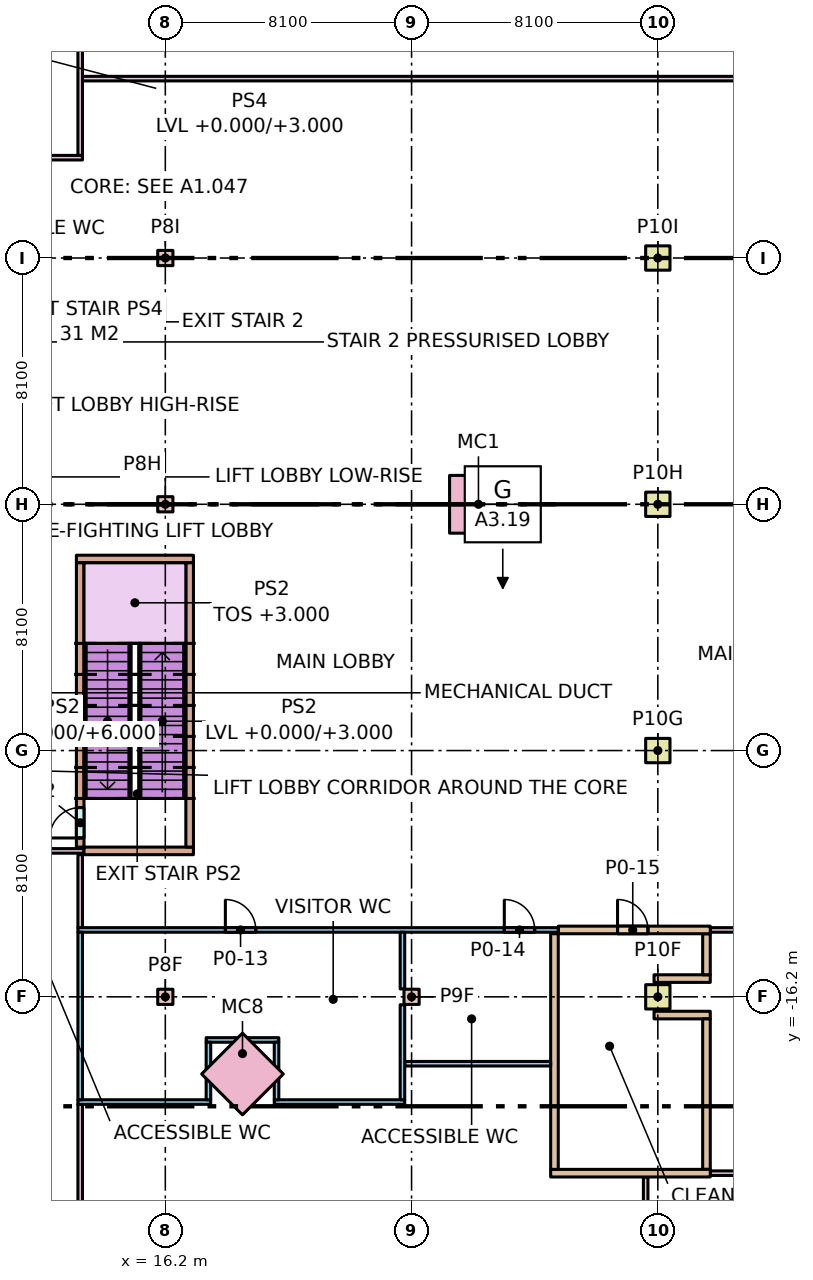
"""IFC4 building model, lengths in metres.
Left out: names, types, materials, properties, quantities, classifications, styles, units other than length and angle.
Written with IfcOpenShell. Run it as: python <this file> out.ifc"""

import sys

from ifc_helpers import new_model, si_unit, direction, frame, frame_2d, origin, origin_2d, place, context, subcontext, project, spatial, rectangle, extrude, element, fill, save


model = new_model("IFC4")
c1 = context("Model", 3, precision=1e-05, world=origin(), true_north=direction((0.0, 1.0)))
c2 = subcontext(c1, "Body", "Model", "MODEL_VIEW")
j1 = project(units=[si_unit("LENGTHUNIT", "METRE"), si_unit("PLANEANGLEUNIT", "RADIAN")], contexts=[c1])
p1 = place(None, origin())
s1 = spatial("IfcSite", under=j1, at=p1, CompositionType="ELEMENT")
p2 = place(p1, origin())
s2 = spatial("IfcBuilding", under=s1, at=p2, CompositionType="ELEMENT")
p3 = place(p2, origin())
s3 = spatial("IfcBuildingStorey", under=s2, at=p3, CompositionType="ELEMENT", Elevation=0.0)
for number, where, z_axis, x_axis in (
    (1, (16.2, -16.2, 0.0), (0.0, 0.0, 1.0), (1.0, 0.0, 0.0)),
    (2, (16.2, 0.0, 0.0), (0.0, 0.0, 1.0), (1.0, 0.0, 0.0)),
    (3, (16.2, 8.1, 0.0), (0.0, 0.0, 1.0), (1.0, 0.0, 0.0)),
    (4, (24.3, -16.2, 0.0), (0.0, 0.0, 1.0), (1.0, 0.0, 0.0)),
):
    element("IfcColumn", number, at=place(p3, frame(where, z_axis=z_axis, x_axis=x_axis)), inside=s3, PredefinedType="COLUMN", context=c2, shape_type="SweptSolid", body=[
        extrude(rectangle(XDim=0.5, YDim=0.5, at=origin_2d()), origin(), (0.0, 0.0, 1.0), 6.0),
    ])
for number, where, z_axis, x_axis in (
    (5, (32.4, -16.2, 0.0), (0.0, 0.0, 1.0), (1.0, 0.0, 0.0)),
    (6, (32.4, -8.1, 0.0), (0.0, 0.0, 1.0), (1.0, 0.0, 0.0)),
    (7, (32.4, 0.0, 0.0), (0.0, 0.0, 1.0), (1.0, 0.0, 0.0)),
    (8, (32.4, 8.1, 0.0), (0.0, 0.0, 1.0), (1.0, 0.0, 0.0)),
):
    element("IfcColumn", number, at=place(p3, frame(where, z_axis=z_axis, x_axis=x_axis)), inside=s3, PredefinedType="COLUMN", context=c2, shape_type="SweptSolid", body=[
        extrude(rectangle(XDim=0.8, YDim=0.8, at=origin_2d()), origin(), (0.0, 0.0, 1.0), 6.0),
    ])
for number, where, z_axis, x_axis in (
    (9, (26.5, 0.0, 0.0), (0.0, 0.0, 1.0), (0.0, 1.0, 0.0)),
    (10, (18.738, -18.738, 0.0), (0.0, 0.0, 1.0), (0.707, 0.707, 0.0)),
):
    element("IfcColumn", number, at=place(p3, frame(where, z_axis=z_axis, x_axis=x_axis)), inside=s3, PredefinedType="COLUMN", context=c2, shape_type="SweptSolid", body=[
        extrude(rectangle(XDim=1.9, YDim=1.9, at=origin_2d()), origin(), (0.0, 0.0, 1.0), 6.0),
    ])
p4 = place(p3, frame((34.125, -14.0, 0.0), z_axis=(0.0, 0.0, 1.0), x_axis=(1.0, 0.0, 0.0)))
e11 = element("IfcWall", 11, at=p4, inside=s3, PredefinedType="PARTITIONING", context=c2, shape_type="SweptSolid", body=[
    extrude(rectangle(XDim=5.85, YDim=0.15, at=frame_2d((2.925, 0.0))), origin(), (0.0, 0.0, 1.0), 5.68),
])
for number, where, z_axis, x_axis in (
    (12, (32.275, -16.8, 0.0), (0.0, 0.0, 1.0), (1.0, 0.0, 0.0)),
    (13, (32.275, -15.6, 0.0), (0.0, 0.0, 1.0), (1.0, 0.0, 0.0)),
):
    element("IfcWall", number, at=place(p3, frame(where, z_axis=z_axis, x_axis=x_axis)), inside=s3, PredefinedType="PARTITIONING", context=c2, shape_type="SweptSolid", body=[
        extrude(rectangle(XDim=1.85, YDim=0.25, at=frame_2d((0.925, 0.0))), origin(), (0.0, 0.0, 1.0), 5.68),
    ])
p5 = place(p3, frame((34.0, -21.875, 0.0), z_axis=(0.0, 0.0, 1.0), x_axis=(0.0, 1.0, 0.0)))
e14 = element("IfcWall", 14, at=p5, inside=s3, PredefinedType="PARTITIONING", context=c2, shape_type="SweptSolid", body=[
    extrude(rectangle(XDim=4.95, YDim=0.25, at=frame_2d((2.475, 0.0))), origin(), (0.0, 0.0, 1.0), 5.68),
])
p6 = place(p3, frame((34.0, -15.475, 0.0), z_axis=(0.0, 0.0, 1.0), x_axis=(0.0, 1.0, 0.0)))
e15 = element("IfcWall", 15, at=p6, inside=s3, PredefinedType="PARTITIONING", context=c2, shape_type="SweptSolid", body=[
    extrude(rectangle(XDim=1.35, YDim=0.25, at=frame_2d((0.675, 0.0))), origin(), (0.0, 0.0, 1.0), 5.68),
])
p7 = place(p3, frame((34.125, -22.0, 0.0), z_axis=(0.0, 0.0, 1.0), x_axis=(1.0, 0.0, 0.0)))
e16 = element("IfcWall", 16, at=p7, inside=s3, PredefinedType="PARTITIONING", context=c2, shape_type="SweptSolid", body=[
    extrude(rectangle(XDim=17.8, YDim=0.15, at=frame_2d((8.9, 0.0))), origin(), (0.0, 0.0, 1.0), 5.68),
])
p8 = place(p3, frame((13.475, 14.0, 0.0), z_axis=(0.0, 0.0, 1.0), x_axis=(1.0, 0.0, 0.0)))
e17 = element("IfcWall", 17, at=p8, inside=s3, PredefinedType="PARTITIONING", context=c2, shape_type="SweptSolid", body=[
    extrude(rectangle(XDim=38.6, YDim=0.15, at=frame_2d((19.3, 0.0))), origin(), (0.0, 0.0, 1.0), 5.68),
])
p9 = place(p8, frame((22.875, 0.0, 0.0)))
e18 = element("IfcOpeningElement", 18, at=p9, cuts=e17, PredefinedType="OPENING", context=c2, shape_type="SweptSolid", body=[
    extrude(rectangle(XDim=1.8, YDim=2.4, at=frame_2d((0.9, 1.2))), frame((0.0, 0.085, 0.0), z_axis=(0.0, -1.0, 0.0), x_axis=(1.0, 0.0, 0.0)), (0.0, 0.0, 1.0), 0.17),
])
p10 = place(p3, frame((13.525, -11.4, 0.0), z_axis=(0.0, 0.0, 1.0), x_axis=(1.0, 0.0, 0.0)))
e19 = element("IfcWall", 19, at=p10, inside=s3, PredefinedType="STANDARD", context=c2, shape_type="SweptSolid", body=[
    extrude(rectangle(XDim=3.6, YDim=0.25, at=frame_2d((1.8, 0.0))), origin(), (0.0, 0.0, 1.0), 5.68),
])
p11 = place(p3, frame((13.275, -1.8, 0.0), z_axis=(0.0, 0.0, 1.0), x_axis=(1.0, 0.0, 0.0)))
e20 = element("IfcWall", 20, at=p11, inside=s3, PredefinedType="STANDARD", context=c2, shape_type="SweptSolid", body=[
    extrude(rectangle(XDim=3.85, YDim=0.25, at=frame_2d((1.925, 0.0))), origin(), (0.0, 0.0, 1.0), 5.68),
])
p12 = place(p3, frame((17.0, -11.275, 0.0), z_axis=(0.0, 0.0, 1.0), x_axis=(0.0, 1.0, 0.0)))
e21 = element("IfcWall", 21, at=p12, inside=s3, PredefinedType="STANDARD", context=c2, shape_type="SweptSolid", body=[
    extrude(rectangle(XDim=9.35, YDim=0.25, at=frame_2d((4.675, 0.0))), origin(), (0.0, 0.0, 1.0), 5.68),
])
p13 = place(p3, frame((13.4, 11.475, 0.0), z_axis=(0.0, 0.0, 1.0), x_axis=(0.0, 1.0, 0.0)))
e22 = element("IfcWall", 22, at=p13, inside=s3, PredefinedType="PARTITIONING", context=c2, shape_type="SweptSolid", body=[
    extrude(rectangle(XDim=32.025, YDim=0.15, at=frame_2d((16.012, 0.0))), origin(), (0.0, 0.0, 1.0), 5.68),
])
p14 = place(p3, frame((13.325, -14.0, 0.0), z_axis=(0.0, 0.0, 1.0), x_axis=(1.0, 0.0, 0.0)))
e23 = element("IfcWall", 23, at=p14, inside=s3, PredefinedType="PARTITIONING", context=c2, shape_type="SweptSolid", body=[
    extrude(rectangle(XDim=15.8, YDim=0.15, at=frame_2d((7.9, 0.0))), origin(), (0.0, 0.0, 1.0), 5.68),
])
p15 = place(p14, frame((4.85, 0.0, 0.0)))
e24 = element("IfcOpeningElement", 24, at=p15, cuts=e23, PredefinedType="OPENING", context=c2, shape_type="SweptSolid", body=[
    extrude(rectangle(XDim=1.0, YDim=2.1, at=frame_2d((0.5, 1.05))), frame((0.0, 0.085, 0.0), z_axis=(0.0, -1.0, 0.0), x_axis=(1.0, 0.0, 0.0)), (0.0, 0.0, 1.0), 0.17),
])
p16 = place(p14, frame((14.025, 0.0, 0.0)))
e25 = element("IfcOpeningElement", 25, at=p16, cuts=e23, PredefinedType="OPENING", context=c2, shape_type="SweptSolid", body=[
    extrude(rectangle(XDim=1.0, YDim=2.1, at=frame_2d((0.5, 1.05))), frame((0.0, 0.085, 0.0), z_axis=(0.0, -1.0, 0.0), x_axis=(1.0, 0.0, 0.0)), (0.0, 0.0, 1.0), 0.17),
])
p17 = place(p3, frame((13.4, -13.925, 0.0), z_axis=(0.0, 0.0, 1.0), x_axis=(0.0, 1.0, 0.0)))
e26 = element("IfcWall", 26, at=p17, inside=s3, PredefinedType="PARTITIONING", context=c2, shape_type="SweptSolid", body=[
    extrude(rectangle(XDim=2.4, YDim=0.15, at=frame_2d((1.2, 0.0))), origin(), (0.0, 0.0, 1.0), 5.68),
])
p18 = place(p3, frame((29.125, -14.0, 0.0), z_axis=(0.0, 0.0, 1.0), x_axis=(1.0, 0.0, 0.0)))
e27 = element("IfcWall", 27, at=p18, inside=s3, PredefinedType="PARTITIONING", context=c2, shape_type="SweptSolid", body=[
    extrude(rectangle(XDim=5.0, YDim=0.25, at=frame_2d((2.5, 0.0))), origin(), (0.0, 0.0, 1.0), 5.68),
])
p19 = place(p18, frame((1.95, 0.0, 0.0)))
e28 = element("IfcOpeningElement", 28, at=p19, cuts=e27, PredefinedType="OPENING", context=c2, shape_type="SweptSolid", body=[
    extrude(rectangle(XDim=1.0, YDim=2.1, at=frame_2d((0.5, 1.05))), frame((0.0, 0.135, 0.0), z_axis=(0.0, -1.0, 0.0), x_axis=(1.0, 0.0, 0.0)), (0.0, 0.0, 1.0), 0.27),
])
p20 = place(p3, frame((13.4, -11.275, 0.0), z_axis=(0.0, 0.0, 1.0), x_axis=(0.0, 1.0, 0.0)))
e29 = element("IfcWall", 29, at=p20, inside=s3, PredefinedType="STANDARD", context=c2, shape_type="SweptSolid", body=[
    extrude(rectangle(XDim=9.35, YDim=0.25, at=frame_2d((4.675, 0.0))), origin(), (0.0, 0.0, 1.0), 5.68),
])
p21 = place(p20, frame((0.3, 0.0, 0.0)))
e30 = element("IfcOpeningElement", 30, at=p21, cuts=e29, PredefinedType="OPENING", context=c2, shape_type="SweptSolid", body=[
    extrude(rectangle(XDim=1.0, YDim=2.1, at=frame_2d((0.5, 1.05))), frame((0.0, 0.135, 0.0), z_axis=(0.0, -1.0, 0.0), x_axis=(1.0, 0.0, 0.0)), (0.0, 0.0, 1.0), 0.27),
])
p22 = place(p3, frame((9.375, 11.4, 0.0), z_axis=(0.0, 0.0, 1.0), x_axis=(1.0, 0.0, 0.0)))
e31 = element("IfcWall", 31, at=p22, inside=s3, PredefinedType="PARTITIONING", context=c2, shape_type="SweptSolid", body=[
    extrude(rectangle(XDim=4.1, YDim=0.15, at=frame_2d((2.05, 0.0))), origin(), (0.0, 0.0, 1.0), 5.68),
])
p23 = place(p22, frame((1.55, 0.0, 0.0)))
e32 = element("IfcOpeningElement", 32, at=p23, cuts=e31, PredefinedType="OPENING", context=c2, shape_type="SweptSolid", body=[
    extrude(rectangle(XDim=1.0, YDim=2.1, at=frame_2d((0.5, 1.05))), frame((0.0, 0.085, 0.0), z_axis=(0.0, -1.0, 0.0), x_axis=(1.0, 0.0, 0.0)), (0.0, 0.0, 1.0), 0.17),
])
p24 = place(p3, frame((3.675, -11.4, 0.0), z_axis=(0.0, 0.0, 1.0), x_axis=(1.0, 0.0, 0.0)))
e33 = element("IfcWall", 33, at=p24, inside=s3, PredefinedType="PARTITIONING", context=c2, shape_type="SweptSolid", body=[
    extrude(rectangle(XDim=9.85, YDim=0.15, at=frame_2d((4.925, 0.0))), origin(), (0.0, 0.0, 1.0), 5.68),
])
p25 = place(p3, frame((24.0, -15.94, 0.0), z_axis=(0.0, 0.0, 1.0), x_axis=(0.0, 1.0, 0.0)))
e34 = element("IfcWall", 34, at=p25, inside=s3, PredefinedType="PARTITIONING", context=c2, shape_type="SweptSolid", body=[
    extrude(rectangle(XDim=1.865, YDim=0.15, at=frame_2d((0.933, 0.0))), origin(), (0.0, 0.0, 1.0), 5.68),
])
p26 = place(p3, frame((24.075, -18.4, 0.0), z_axis=(0.0, 0.0, 1.0), x_axis=(1.0, 0.0, 0.0)))
e35 = element("IfcWall", 35, at=p26, inside=s3, PredefinedType="PARTITIONING", context=c2, shape_type="SweptSolid", body=[
    extrude(rectangle(XDim=4.8, YDim=0.15, at=frame_2d((2.4, 0.0))), origin(), (0.0, 0.0, 1.0), 5.68),
])
p27 = place(p3, frame((28.875, -22.0, 0.0), z_axis=(0.0, 0.0, 1.0), x_axis=(1.0, 0.0, 0.0)))
e36 = element("IfcWall", 36, at=p27, inside=s3, PredefinedType="PARTITIONING", context=c2, shape_type="SweptSolid", body=[
    extrude(rectangle(XDim=5.25, YDim=0.25, at=frame_2d((2.625, 0.0))), origin(), (0.0, 0.0, 1.0), 5.68),
])
p28 = place(p3, frame((29.0, -21.875, 0.0), z_axis=(0.0, 0.0, 1.0), x_axis=(0.0, 1.0, 0.0)))
e37 = element("IfcWall", 37, at=p28, inside=s3, PredefinedType="PARTITIONING", context=c2, shape_type="SweptSolid", body=[
    extrude(rectangle(XDim=7.75, YDim=0.25, at=frame_2d((3.875, 0.0))), origin(), (0.0, 0.0, 1.0), 5.68),
])
p29 = place(p3, frame((13.325, -19.66, 0.0), z_axis=(0.0, 0.0, 1.0), x_axis=(1.0, 0.0, 0.0)))
e38 = element("IfcWall", 38, at=p29, inside=s3, PredefinedType="PARTITIONING", context=c2, shape_type="SweptSolid", body=[
    extrude(rectangle(XDim=4.368, YDim=0.15, at=frame_2d((2.184, 0.0))), origin(), (0.0, 0.0, 1.0), 5.68),
])
p30 = place(p3, frame((19.783, -19.66, 0.0), z_axis=(0.0, 0.0, 1.0), x_axis=(1.0, 0.0, 0.0)))
e39 = element("IfcWall", 39, at=p30, inside=s3, PredefinedType="PARTITIONING", context=c2, shape_type="SweptSolid", body=[
    extrude(rectangle(XDim=4.292, YDim=0.15, at=frame_2d((2.146, 0.0))), origin(), (0.0, 0.0, 1.0), 5.68),
])
p31 = place(p3, frame((17.543, -17.618, 0.0), z_axis=(0.0, 0.0, 1.0), x_axis=(1.0, 0.0, 0.0)))
e40 = element("IfcWall", 40, at=p31, inside=s3, PredefinedType="PARTITIONING", context=c2, shape_type="SweptSolid", body=[
    extrude(rectangle(XDim=2.39, YDim=0.15, at=frame_2d((1.195, 0.0))), origin(), (0.0, 0.0, 1.0), 5.68),
])
for number, where, z_axis, x_axis in (
    (41, (17.618, -19.585, 0.0), (0.0, 0.0, 1.0), (0.0, 1.0, 0.0)),
    (42, (19.858, -19.585, 0.0), (0.0, 0.0, 1.0), (0.0, 1.0, 0.0)),
):
    element("IfcWall", number, at=place(p3, frame(where, z_axis=z_axis, x_axis=x_axis)), inside=s3, PredefinedType="PARTITIONING", context=c2, shape_type="SweptSolid", body=[
        extrude(rectangle(XDim=1.892, YDim=0.15, at=frame_2d((0.946, 0.0))), origin(), (0.0, 0.0, 1.0), 5.68),
    ])
p32 = place(p3, frame((24.0, -19.585, 0.0), z_axis=(0.0, 0.0, 1.0), x_axis=(0.0, 1.0, 0.0)))
e43 = element("IfcWall", 43, at=p32, inside=s3, PredefinedType="PARTITIONING", context=c2, shape_type="SweptSolid", body=[
    extrude(rectangle(XDim=3.125, YDim=0.15, at=frame_2d((1.563, 0.0))), origin(), (0.0, 0.0, 1.0), 5.68),
])
p33 = place(p3, frame((13.4, -19.585, 0.0), z_axis=(0.0, 0.0, 1.0), x_axis=(0.0, 1.0, 0.0)))
e44 = element("IfcWall", 44, at=p33, inside=s3, PredefinedType="PARTITIONING", context=c2, shape_type="SweptSolid", body=[
    extrude(rectangle(XDim=5.51, YDim=0.15, at=frame_2d((2.755, 0.0))), origin(), (0.0, 0.0, 1.0), 5.68),
])
p34 = place(p3, frame((13.4, -43.575, 0.0), z_axis=(0.0, 0.0, 1.0), x_axis=(0.0, 1.0, 0.0)))
e45 = element("IfcWall", 45, at=p34, inside=s3, PredefinedType="PARTITIONING", context=c2, shape_type="SweptSolid", body=[
    extrude(rectangle(XDim=23.84, YDim=0.15, at=frame_2d((11.92, 0.0))), origin(), (0.0, 0.0, 1.0), 5.68),
])
p35 = place(p3, frame((32.0, -23.89, 0.0), z_axis=(0.0, 0.0, 1.0), x_axis=(0.0, 1.0, 0.0)))
e46 = element("IfcWall", 46, at=p35, inside=s3, PredefinedType="PARTITIONING", context=c2, shape_type="SweptSolid", body=[
    extrude(rectangle(XDim=1.765, YDim=0.15, at=frame_2d((0.882, 0.0))), origin(), (0.0, 0.0, 1.0), 5.68),
])
p36 = place(p21, origin())
e47 = element("IfcDoor", 47, at=p36, inside=s3, OperationType="SINGLE_SWING_LEFT", PredefinedType="DOOR", context=c2, shape_type="SweptSolid", body=[
    extrude(rectangle(XDim=1.0, YDim=2.1, at=frame_2d((0.5, 1.05))), frame((0.0, 0.025, 0.0), z_axis=(0.0, -1.0, 0.0), x_axis=(1.0, 0.0, 0.0)), (0.0, 0.0, 1.0), 0.05),
])
fill(e30, e47)
p37 = place(p15, origin())
e48 = element("IfcDoor", 48, at=p37, inside=s3, OperationType="SINGLE_SWING_LEFT", PredefinedType="DOOR", context=c2, shape_type="SweptSolid", body=[
    extrude(rectangle(XDim=1.0, YDim=2.1, at=frame_2d((0.5, 1.05))), frame((0.0, 0.025, 0.0), z_axis=(0.0, -1.0, 0.0), x_axis=(1.0, 0.0, 0.0)), (0.0, 0.0, 1.0), 0.05),
])
fill(e24, e48)
p38 = place(p16, origin())
e49 = element("IfcDoor", 49, at=p38, inside=s3, OperationType="SINGLE_SWING_LEFT", PredefinedType="DOOR", context=c2, shape_type="SweptSolid", body=[
    extrude(rectangle(XDim=1.0, YDim=2.1, at=frame_2d((0.5, 1.05))), frame((0.0, 0.025, 0.0), z_axis=(0.0, -1.0, 0.0), x_axis=(1.0, 0.0, 0.0)), (0.0, 0.0, 1.0), 0.05),
])
fill(e25, e49)
p39 = place(p19, origin())
e50 = element("IfcDoor", 50, at=p39, inside=s3, OperationType="SINGLE_SWING_LEFT", PredefinedType="DOOR", context=c2, shape_type="SweptSolid", body=[
    extrude(rectangle(XDim=1.0, YDim=2.1, at=frame_2d((0.5, 1.05))), frame((0.0, 0.025, 0.0), z_axis=(0.0, -1.0, 0.0), x_axis=(1.0, 0.0, 0.0)), (0.0, 0.0, 1.0), 0.05),
])
fill(e28, e50)
save(model, sys.argv[1])
